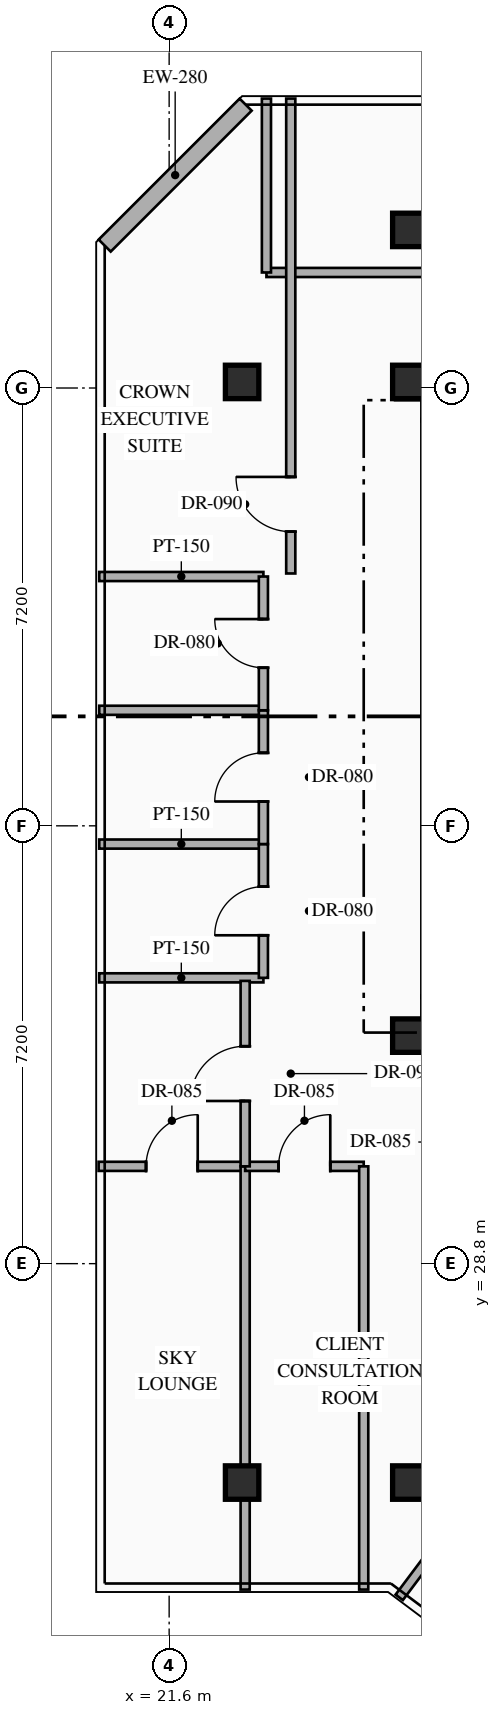
"""IFC4 building model, lengths in metres.
Left out: names, types, materials, properties, quantities, classifications, styles, units other than length and angle.
Written with IfcOpenShell. Run it as: python <this file> out.ifc"""

import sys

from ifc_helpers import new_model, si_unit, direction, frame, frame_2d, origin, origin_2d, place, context, subcontext, project, spatial, rectangle, hollow_rectangle, extrude, element, fill, save


model = new_model("IFC4")
c1 = context("Model", 3, precision=1e-05, world=origin(), true_north=direction((0.0, 1.0)))
c2 = subcontext(c1, "Body", "Model", "MODEL_VIEW")
j1 = project(units=[si_unit("LENGTHUNIT", "METRE"), si_unit("PLANEANGLEUNIT", "RADIAN")], contexts=[c1])
p1 = place(None, origin())
s1 = spatial("IfcSite", under=j1, at=p1, CompositionType="ELEMENT")
p2 = place(p1, origin())
s2 = spatial("IfcBuilding", under=s1, at=p2, CompositionType="ELEMENT")
p3 = place(p2, frame((0.0, 0.0, 285.95)))
s3 = spatial("IfcBuildingStorey", under=s2, at=p3, CompositionType="ELEMENT", Elevation=285.95)
for number, where, z_axis, x_axis in (
    (1, (25.55, 32.55, 0.0), (0.0, 0.0, 1.0), (1.0, 0.0, 0.0)),
    (2, (25.55, 43.3, 0.0), (0.0, 0.0, 1.0), (1.0, 0.0, 0.0)),
    (3, (25.55, 25.2, 0.0), (0.0, 0.0, 1.0), (1.0, 0.0, 0.0)),
    (4, (25.55, 45.8, 0.0), (0.0, 0.0, 1.0), (1.0, 0.0, 0.0)),
    (5, (22.8, 25.2, 0.0), (0.0, 0.0, 1.0), (1.0, 0.0, 0.0)),
    (6, (22.8, 43.3, 0.0), (0.0, 0.0, 1.0), (1.0, 0.0, 0.0)),
):
    element("IfcColumn", number, at=place(p3, frame(where, z_axis=z_axis, x_axis=x_axis)), inside=s3, PredefinedType="COLUMN", context=c2, shape_type="SweptSolid", body=[
        extrude(hollow_rectangle(XDim=0.55, YDim=0.55, WallThickness=0.022, at=origin_2d()), origin(), (0.0, 0.0, 1.0), 4.0),
    ])
p4 = place(p3, frame((20.54, 45.542, 0.0), z_axis=(0.0, 0.0, 1.0), x_axis=(0.707069542501, 0.707144017911, 0.0)))
e7 = element("IfcWall", 7, at=p4, inside=s3, PredefinedType="STANDARD", context=c2, shape_type="SweptSolid", body=[
    extrude(rectangle(XDim=3.278, YDim=0.28, at=frame_2d((1.639, 0.0))), origin(), (0.0, 0.0, 1.0), 3.7),
])
for number, where, z_axis, x_axis in (
    (8, (20.45, 33.5, 0.0), (0.0, 0.0, 1.0), (1.0, 0.0, 0.0)),
    (9, (20.45, 40.1, 0.0), (0.0, 0.0, 1.0), (1.0, 0.0, 0.0)),
    (10, (20.45, 35.7, 0.0), (0.0, 0.0, 1.0), (1.0, 0.0, 0.0)),
    (11, (20.45, 37.9, 0.0), (0.0, 0.0, 1.0), (1.0, 0.0, 0.0)),
):
    element("IfcWall", number, at=place(p3, frame(where, z_axis=z_axis, x_axis=x_axis)), inside=s3, PredefinedType="PARTITIONING", context=c2, shape_type="SweptSolid", body=[
        extrude(rectangle(XDim=2.7, YDim=0.15, at=frame_2d((1.35, 0.0))), origin(), (0.0, 0.0, 1.0), 3.7),
    ])
p5 = place(p3, frame((23.15, 33.5, 0.0), z_axis=(0.0, 0.0, 1.0), x_axis=(0.0, 1.0, 0.0)))
e12 = element("IfcWall", 12, at=p5, inside=s3, PredefinedType="PARTITIONING", context=c2, shape_type="SweptSolid", body=[
    extrude(rectangle(XDim=2.2, YDim=0.15, at=frame_2d((1.1, 0.0))), origin(), (0.0, 0.0, 1.0), 3.7),
])
p6 = place(p5, frame((0.7, 0.0, 0.0)))
e13 = element("IfcOpeningElement", 13, at=p6, cuts=e12, PredefinedType="OPENING", context=c2, shape_type="SweptSolid", body=[
    extrude(rectangle(XDim=0.8, YDim=2.06, at=frame_2d((0.4, 1.03))), frame((0.0, 0.085, 0.0), z_axis=(0.0, -1.0, 0.0), x_axis=(1.0, 0.0, 0.0)), (0.0, 0.0, 1.0), 0.17),
])
p7 = place(p3, frame((23.15, 35.7, 0.0), z_axis=(0.0, 0.0, 1.0), x_axis=(0.0, 1.0, 0.0)))
e14 = element("IfcWall", 14, at=p7, inside=s3, PredefinedType="PARTITIONING", context=c2, shape_type="SweptSolid", body=[
    extrude(rectangle(XDim=2.2, YDim=0.15, at=frame_2d((1.1, 0.0))), origin(), (0.0, 0.0, 1.0), 3.7),
])
p8 = place(p7, frame((0.7, 0.0, 0.0)))
e15 = element("IfcOpeningElement", 15, at=p8, cuts=e14, PredefinedType="OPENING", context=c2, shape_type="SweptSolid", body=[
    extrude(rectangle(XDim=0.8, YDim=2.06, at=frame_2d((0.4, 1.03))), frame((0.0, 0.085, 0.0), z_axis=(0.0, -1.0, 0.0), x_axis=(1.0, 0.0, 0.0)), (0.0, 0.0, 1.0), 0.17),
])
p9 = place(p3, frame((23.15, 37.9, 0.0), z_axis=(0.0, 0.0, 1.0), x_axis=(0.0, 1.0, 0.0)))
e16 = element("IfcWall", 16, at=p9, inside=s3, PredefinedType="PARTITIONING", context=c2, shape_type="SweptSolid", body=[
    extrude(rectangle(XDim=2.2, YDim=0.15, at=frame_2d((1.1, 0.0))), origin(), (0.0, 0.0, 1.0), 3.7),
])
p10 = place(p9, frame((0.7, 0.0, 0.0)))
e17 = element("IfcOpeningElement", 17, at=p10, cuts=e16, PredefinedType="OPENING", context=c2, shape_type="SweptSolid", body=[
    extrude(rectangle(XDim=0.8, YDim=2.06, at=frame_2d((0.4, 1.03))), frame((0.0, 0.085, 0.0), z_axis=(0.0, -1.0, 0.0), x_axis=(1.0, 0.0, 0.0)), (0.0, 0.0, 1.0), 0.17),
])
p11 = place(p3, frame((23.2, 45.1, 0.0), z_axis=(0.0, 0.0, 1.0), x_axis=(1.0, 0.0, 0.0)))
e18 = element("IfcWall", 18, at=p11, inside=s3, PredefinedType="PARTITIONING", context=c2, shape_type="SweptSolid", body=[
    extrude(rectangle(XDim=21.76, YDim=0.15, at=frame_2d((10.88, 0.0))), origin(), (0.0, 0.0, 1.0), 3.7),
])
p12 = place(p11, frame((13.38, 0.0, 0.0)))
e19 = element("IfcOpeningElement", 19, at=p12, cuts=e18, PredefinedType="OPENING", context=c2, shape_type="SweptSolid", body=[
    extrude(rectangle(XDim=1.0, YDim=2.15, at=frame_2d((0.5, 1.075))), frame((0.0, 0.085, 0.0), z_axis=(0.0, -1.0, 0.0), x_axis=(1.0, 0.0, 0.0)), (0.0, 0.0, 1.0), 0.17),
])
p13 = place(p3, frame((23.2, 45.1, 0.0), z_axis=(0.0, 0.0, 1.0), x_axis=(0.0, 1.0, 0.0)))
e20 = element("IfcWall", 20, at=p13, inside=s3, PredefinedType="PARTITIONING", context=c2, shape_type="SweptSolid", body=[
    extrude(rectangle(XDim=2.86, YDim=0.15, at=frame_2d((1.43, 0.0))), origin(), (0.0, 0.0, 1.0), 3.7),
])
p14 = place(p3, frame((20.44, 30.4, 0.0), z_axis=(0.0, 0.0, 1.0), x_axis=(1.0, 0.0, 0.0)))
e21 = element("IfcWall", 21, at=p14, inside=s3, PredefinedType="PARTITIONING", context=c2, shape_type="SweptSolid", body=[
    extrude(rectangle(XDim=2.41, YDim=0.15, at=frame_2d((1.205, 0.0))), origin(), (0.0, 0.0, 1.0), 3.7),
])
p15 = place(p14, frame((0.78, 0.0, 0.0)))
e22 = element("IfcOpeningElement", 22, at=p15, cuts=e21, PredefinedType="OPENING", context=c2, shape_type="SweptSolid", body=[
    extrude(rectangle(XDim=0.85, YDim=2.08, at=frame_2d((0.425, 1.04))), frame((0.0, 0.085, 0.0), z_axis=(0.0, -1.0, 0.0), x_axis=(1.0, 0.0, 0.0)), (0.0, 0.0, 1.0), 0.17),
])
p16 = place(p3, frame((22.85, 23.44, 0.0), z_axis=(0.0, 0.0, 1.0), x_axis=(0.0, 1.0, 0.0)))
e23 = element("IfcWall", 23, at=p16, inside=s3, PredefinedType="PARTITIONING", context=c2, shape_type="SweptSolid", body=[
    extrude(rectangle(XDim=6.96, YDim=0.15, at=frame_2d((3.48, 0.0))), origin(), (0.0, 0.0, 1.0), 3.245),
])
p17 = place(p3, frame((22.85, 30.4, 0.0), z_axis=(0.0, 0.0, 1.0), x_axis=(1.0, 0.0, 0.0)))
e24 = element("IfcWall", 24, at=p17, inside=s3, PredefinedType="PARTITIONING", context=c2, shape_type="SweptSolid", body=[
    extrude(rectangle(XDim=1.95, YDim=0.15, at=frame_2d((0.975, 0.0))), origin(), (0.0, 0.0, 1.0), 3.7),
])
p18 = place(p17, frame((0.55, 0.0, 0.0)))
e25 = element("IfcOpeningElement", 25, at=p18, cuts=e24, PredefinedType="OPENING", context=c2, shape_type="SweptSolid", body=[
    extrude(rectangle(XDim=0.85, YDim=2.08, at=frame_2d((0.425, 1.04))), frame((0.0, 0.085, 0.0), z_axis=(0.0, -1.0, 0.0), x_axis=(1.0, 0.0, 0.0)), (0.0, 0.0, 1.0), 0.17),
])
p19 = place(p3, frame((24.8, 23.44, 0.0), z_axis=(0.0, 0.0, 1.0), x_axis=(0.0, 1.0, 0.0)))
e26 = element("IfcWall", 26, at=p19, inside=s3, PredefinedType="PARTITIONING", context=c2, shape_type="SweptSolid", body=[
    extrude(rectangle(XDim=6.96, YDim=0.15, at=frame_2d((3.48, 0.0))), origin(), (0.0, 0.0, 1.0), 3.7),
])
p20 = place(p3, frame((22.85, 30.4, 0.0), z_axis=(0.0, 0.0, 1.0), x_axis=(0.0, 1.0, 0.0)))
e27 = element("IfcWall", 27, at=p20, inside=s3, PredefinedType="PARTITIONING", context=c2, shape_type="SweptSolid", body=[
    extrude(rectangle(XDim=3.05, YDim=0.15, at=frame_2d((1.525, 0.0))), origin(), (0.0, 0.0, 1.0), 3.245),
])
p21 = place(p20, frame((1.075, 0.0, 0.0)))
e28 = element("IfcOpeningElement", 28, at=p21, cuts=e27, PredefinedType="OPENING", context=c2, shape_type="SweptSolid", body=[
    extrude(rectangle(XDim=0.9, YDim=2.15, at=frame_2d((0.45, 1.075))), frame((0.0, 0.085, 0.0), z_axis=(0.0, -1.0, 0.0), x_axis=(1.0, 0.0, 0.0)), (0.0, 0.0, 1.0), 0.17),
])
p22 = place(p3, frame((23.6, 40.15, 0.0), z_axis=(0.0, 0.0, 1.0), x_axis=(0.0, 1.0, 0.0)))
e29 = element("IfcWall", 29, at=p22, inside=s3, PredefinedType="PARTITIONING", context=c2, shape_type="SweptSolid", body=[
    extrude(rectangle(XDim=7.81, YDim=0.15, at=frame_2d((3.905, 0.0))), origin(), (0.0, 0.0, 1.0), 3.7),
])
p23 = place(p22, frame((0.688, 0.0, 0.0)))
e30 = element("IfcOpeningElement", 30, at=p23, cuts=e29, PredefinedType="OPENING", context=c2, shape_type="SweptSolid", body=[
    extrude(rectangle(XDim=0.9, YDim=2.15, at=frame_2d((0.45, 1.075))), frame((0.0, 0.085, 0.0), z_axis=(0.0, -1.0, 0.0), x_axis=(1.0, 0.0, 0.0)), (0.0, 0.0, 1.0), 0.17),
])
p24 = place(p3, frame((25.384, 23.312, 0.0), z_axis=(0.0, 0.0, 1.0), x_axis=(0.599983234706, 0.800012573696, 0.0)))
e31 = element("IfcWall", 31, at=p24, inside=s3, PredefinedType="PARTITIONING", context=c2, shape_type="SweptSolid", body=[
    extrude(rectangle(XDim=4.66, YDim=0.15, at=frame_2d((2.33, 0.0))), origin(), (0.0, 0.0, 1.0), 3.7),
])
p25 = place(p6, origin())
e32 = element("IfcDoor", 32, at=p25, inside=s3, OperationType="SINGLE_SWING_LEFT", PredefinedType="DOOR", context=c2, shape_type="SweptSolid", body=[
    extrude(rectangle(XDim=0.8, YDim=2.06, at=frame_2d((0.4, 1.03))), frame((0.0, 0.025, 0.0), z_axis=(0.0, -1.0, 0.0), x_axis=(1.0, 0.0, 0.0)), (0.0, 0.0, 1.0), 0.05),
])
fill(e13, e32)
p26 = place(p8, origin())
e33 = element("IfcDoor", 33, at=p26, inside=s3, OperationType="SINGLE_SWING_LEFT", PredefinedType="DOOR", context=c2, shape_type="SweptSolid", body=[
    extrude(rectangle(XDim=0.8, YDim=2.06, at=frame_2d((0.4, 1.03))), frame((0.0, 0.025, 0.0), z_axis=(0.0, -1.0, 0.0), x_axis=(1.0, 0.0, 0.0)), (0.0, 0.0, 1.0), 0.05),
])
fill(e15, e33)
p27 = place(p10, origin())
e34 = element("IfcDoor", 34, at=p27, inside=s3, OperationType="SINGLE_SWING_RIGHT", PredefinedType="DOOR", context=c2, shape_type="SweptSolid", body=[
    extrude(rectangle(XDim=0.8, YDim=2.06, at=frame_2d((0.4, 1.03))), frame((0.0, 0.025, 0.0), z_axis=(0.0, -1.0, 0.0), x_axis=(1.0, 0.0, 0.0)), (0.0, 0.0, 1.0), 0.05),
])
fill(e17, e34)
p28 = place(p15, origin())
e35 = element("IfcDoor", 35, at=p28, inside=s3, OperationType="SINGLE_SWING_RIGHT", PredefinedType="DOOR", context=c2, shape_type="SweptSolid", body=[
    extrude(rectangle(XDim=0.85, YDim=2.08, at=frame_2d((0.425, 1.04))), frame((0.0, 0.025, 0.0), z_axis=(0.0, -1.0, 0.0), x_axis=(1.0, 0.0, 0.0)), (0.0, 0.0, 1.0), 0.05),
])
fill(e22, e35)
p29 = place(p18, origin())
e36 = element("IfcDoor", 36, at=p29, inside=s3, OperationType="SINGLE_SWING_RIGHT", PredefinedType="DOOR", context=c2, shape_type="SweptSolid", body=[
    extrude(rectangle(XDim=0.85, YDim=2.08, at=frame_2d((0.425, 1.04))), frame((0.0, 0.025, 0.0), z_axis=(0.0, -1.0, 0.0), x_axis=(1.0, 0.0, 0.0)), (0.0, 0.0, 1.0), 0.05),
])
fill(e25, e36)
p30 = place(p21, origin())
e37 = element("IfcDoor", 37, at=p30, inside=s3, OperationType="SINGLE_SWING_LEFT", PredefinedType="DOOR", context=c2, shape_type="SweptSolid", body=[
    extrude(rectangle(XDim=0.9, YDim=2.15, at=frame_2d((0.45, 1.075))), frame((0.0, 0.025, 0.0), z_axis=(0.0, -1.0, 0.0), x_axis=(1.0, 0.0, 0.0)), (0.0, 0.0, 1.0), 0.05),
])
fill(e28, e37)
p31 = place(p23, origin())
e38 = element("IfcDoor", 38, at=p31, inside=s3, OperationType="SINGLE_SWING_RIGHT", PredefinedType="DOOR", context=c2, shape_type="SweptSolid", body=[
    extrude(rectangle(XDim=0.9, YDim=2.15, at=frame_2d((0.45, 1.075))), frame((0.0, 0.025, 0.0), z_axis=(0.0, -1.0, 0.0), x_axis=(1.0, 0.0, 0.0)), (0.0, 0.0, 1.0), 0.05),
])
fill(e30, e38)
save(model, sys.argv[1])
